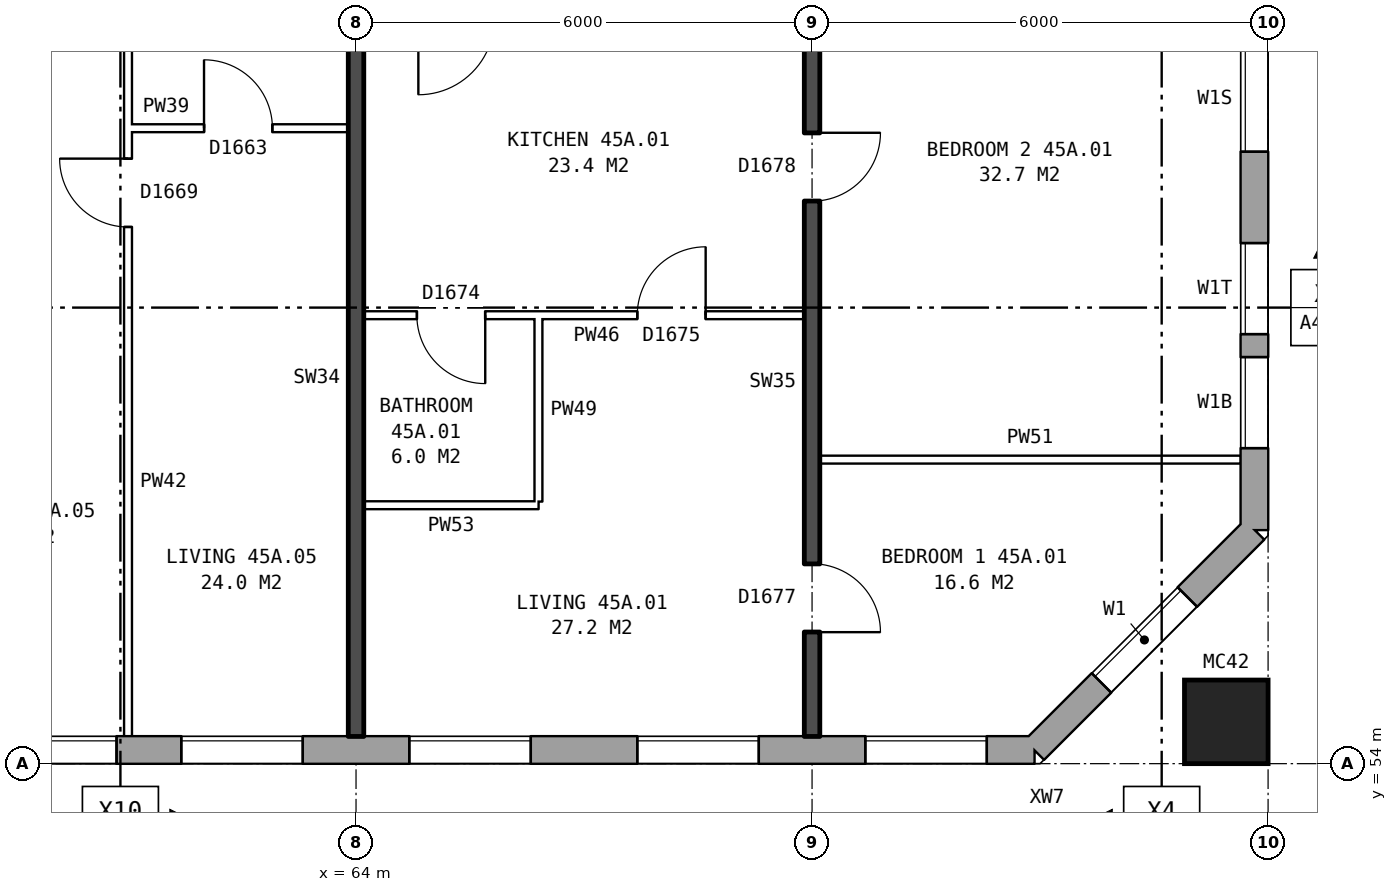
"""IFC4 building model, lengths in metres.
Left out: names, types, materials, properties, quantities, classifications, styles, units other than length and angle.
Written with IfcOpenShell. Run it as: python <this file> out.ifc"""

import sys

from ifc_helpers import new_model, si_unit, direction, frame, frame_2d, origin, origin_2d, place, context, subcontext, project, spatial, rectangle, hollow_rectangle, extrude, element, fill, save


model = new_model("IFC4")
c1 = context("Model", 3, precision=1e-05, world=origin(), true_north=direction((0.0, 1.0)))
c2 = subcontext(c1, "Body", "Model", "MODEL_VIEW")
j1 = project(units=[si_unit("LENGTHUNIT", "METRE"), si_unit("PLANEANGLEUNIT", "RADIAN")], contexts=[c1])
p1 = place(None, origin())
s1 = spatial("IfcSite", under=j1, at=p1, CompositionType="ELEMENT")
p2 = place(p1, origin())
s2 = spatial("IfcBuilding", under=s1, at=p2, CompositionType="ELEMENT")
p3 = place(p2, frame((0.0, 0.0, 160.9)))
s3 = spatial("IfcBuildingStorey", under=s2, at=p3, CompositionType="ELEMENT", Elevation=160.9)
p4 = place(p3, frame((75.45, 54.55, 0.0), z_axis=(0.0, 0.0, 1.0), x_axis=(1.0, 0.0, 0.0)))
e1 = element("IfcColumn", 1, at=p4, inside=s3, PredefinedType="COLUMN", context=c2, shape_type="SweptSolid", body=[
    extrude(hollow_rectangle(XDim=1.1, YDim=1.1, WallThickness=0.06, at=origin_2d()), origin(), (0.0, 0.0, 1.0), 3.1),
])
p5 = place(p3, frame((31.575, 54.18, 0.0), z_axis=(0.0, 0.0, 1.0), x_axis=(1.0, 0.0, 0.0)))
e2 = element("IfcWall", 2, at=p5, inside=s3, PredefinedType="STANDARD", context=c2, shape_type="SweptSolid", body=[
    extrude(rectangle(XDim=41.351, YDim=0.36, at=frame_2d((20.675, 0.0))), origin(), (0.0, 0.0, 1.0), 2.85),
])
p6 = place(p5, frame((3.125, 0.0, 0.8)))
e3 = element("IfcOpeningElement", 3, at=p6, cuts=e2, PredefinedType="OPENING", context=c2, shape_type="SweptSolid", body=[
    extrude(rectangle(XDim=1.6, YDim=1.8, at=frame_2d((0.8, 0.9))), frame((0.0, 0.19, 0.0), z_axis=(0.0, -1.0, 0.0), x_axis=(1.0, 0.0, 0.0)), (0.0, 0.0, 1.0), 0.38),
])
p7 = place(p5, frame((6.125, 0.0, 0.8)))
e4 = element("IfcOpeningElement", 4, at=p7, cuts=e2, PredefinedType="OPENING", context=c2, shape_type="SweptSolid", body=[
    extrude(rectangle(XDim=1.6, YDim=1.8, at=frame_2d((0.8, 0.9))), frame((0.0, 0.19, 0.0), z_axis=(0.0, -1.0, 0.0), x_axis=(1.0, 0.0, 0.0)), (0.0, 0.0, 1.0), 0.38),
])
p8 = place(p5, frame((9.125, 0.0, 0.8)))
e5 = element("IfcOpeningElement", 5, at=p8, cuts=e2, PredefinedType="OPENING", context=c2, shape_type="SweptSolid", body=[
    extrude(rectangle(XDim=1.6, YDim=1.8, at=frame_2d((0.8, 0.9))), frame((0.0, 0.19, 0.0), z_axis=(0.0, -1.0, 0.0), x_axis=(1.0, 0.0, 0.0)), (0.0, 0.0, 1.0), 0.38),
])
p9 = place(p5, frame((12.125, 0.0, 0.8)))
e6 = element("IfcOpeningElement", 6, at=p9, cuts=e2, PredefinedType="OPENING", context=c2, shape_type="SweptSolid", body=[
    extrude(rectangle(XDim=1.6, YDim=1.8, at=frame_2d((0.8, 0.9))), frame((0.0, 0.19, 0.0), z_axis=(0.0, -1.0, 0.0), x_axis=(1.0, 0.0, 0.0)), (0.0, 0.0, 1.0), 0.38),
])
p10 = place(p5, frame((15.375, 0.0, 0.25)))
e7 = element("IfcOpeningElement", 7, at=p10, cuts=e2, PredefinedType="OPENING", context=c2, shape_type="SweptSolid", body=[
    extrude(rectangle(XDim=0.6, YDim=0.9, at=frame_2d((0.3, 0.45))), frame((0.0, 0.19, 0.0), z_axis=(0.0, -1.0, 0.0), x_axis=(1.0, 0.0, 0.0)), (0.0, 0.0, 1.0), 0.38),
])
p11 = place(p5, frame((18.125, 0.0, 0.8)))
e8 = element("IfcOpeningElement", 8, at=p11, cuts=e2, PredefinedType="OPENING", context=c2, shape_type="SweptSolid", body=[
    extrude(rectangle(XDim=1.6, YDim=1.8, at=frame_2d((0.8, 0.9))), frame((0.0, 0.19, 0.0), z_axis=(0.0, -1.0, 0.0), x_axis=(1.0, 0.0, 0.0)), (0.0, 0.0, 1.0), 0.38),
])
p12 = place(p5, frame((21.125, 0.0, 0.8)))
e9 = element("IfcOpeningElement", 9, at=p12, cuts=e2, PredefinedType="OPENING", context=c2, shape_type="SweptSolid", body=[
    extrude(rectangle(XDim=1.6, YDim=1.8, at=frame_2d((0.8, 0.9))), frame((0.0, 0.19, 0.0), z_axis=(0.0, -1.0, 0.0), x_axis=(1.0, 0.0, 0.0)), (0.0, 0.0, 1.0), 0.38),
])
p13 = place(p5, frame((23.575, 0.0, 0.25)))
e10 = element("IfcOpeningElement", 10, at=p13, cuts=e2, PredefinedType="OPENING", context=c2, shape_type="SweptSolid", body=[
    extrude(rectangle(XDim=1.2, YDim=1.8, at=frame_2d((0.6, 0.9))), frame((0.0, 0.19, 0.0), z_axis=(0.0, -1.0, 0.0), x_axis=(1.0, 0.0, 0.0)), (0.0, 0.0, 1.0), 0.38),
])
p14 = place(p5, frame((26.625, 0.0, 1.7)))
e11 = element("IfcOpeningElement", 11, at=p14, cuts=e2, PredefinedType="OPENING", context=c2, shape_type="SweptSolid", body=[
    extrude(rectangle(XDim=0.6, YDim=0.9, at=frame_2d((0.3, 0.45))), frame((0.0, 0.19, 0.0), z_axis=(0.0, -1.0, 0.0), x_axis=(1.0, 0.0, 0.0)), (0.0, 0.0, 1.0), 0.38),
])
p15 = place(p5, frame((30.125, 0.0, 0.8)))
e12 = element("IfcOpeningElement", 12, at=p15, cuts=e2, PredefinedType="OPENING", context=c2, shape_type="SweptSolid", body=[
    extrude(rectangle(XDim=1.6, YDim=1.8, at=frame_2d((0.8, 0.9))), frame((0.0, 0.19, 0.0), z_axis=(0.0, -1.0, 0.0), x_axis=(1.0, 0.0, 0.0)), (0.0, 0.0, 1.0), 0.38),
])
p16 = place(p5, frame((33.125, 0.0, 0.8)))
e13 = element("IfcOpeningElement", 13, at=p16, cuts=e2, PredefinedType="OPENING", context=c2, shape_type="SweptSolid", body=[
    extrude(rectangle(XDim=1.6, YDim=1.8, at=frame_2d((0.8, 0.9))), frame((0.0, 0.19, 0.0), z_axis=(0.0, -1.0, 0.0), x_axis=(1.0, 0.0, 0.0)), (0.0, 0.0, 1.0), 0.38),
])
p17 = place(p5, frame((36.125, 0.0, 0.8)))
e14 = element("IfcOpeningElement", 14, at=p17, cuts=e2, PredefinedType="OPENING", context=c2, shape_type="SweptSolid", body=[
    extrude(rectangle(XDim=1.6, YDim=1.8, at=frame_2d((0.8, 0.9))), frame((0.0, 0.19, 0.0), z_axis=(0.0, -1.0, 0.0), x_axis=(1.0, 0.0, 0.0)), (0.0, 0.0, 1.0), 0.38),
])
p18 = place(p5, frame((39.125, 0.0, 0.8)))
e15 = element("IfcOpeningElement", 15, at=p18, cuts=e2, PredefinedType="OPENING", context=c2, shape_type="SweptSolid", body=[
    extrude(rectangle(XDim=1.6, YDim=1.8, at=frame_2d((0.8, 0.9))), frame((0.0, 0.19, 0.0), z_axis=(0.0, -1.0, 0.0), x_axis=(1.0, 0.0, 0.0)), (0.0, 0.0, 1.0), 0.38),
])
p19 = place(p5, frame((16.275, 0.0, 0.35)))
e16 = element("IfcOpeningElement", 16, at=p19, cuts=e2, PredefinedType="OPENING", context=c2, shape_type="SweptSolid", body=[
    extrude(rectangle(XDim=1.0, YDim=1.5, at=frame_2d((0.5, 0.75))), frame((0.0, 0.19, 0.0), z_axis=(0.0, -1.0, 0.0), x_axis=(1.0, 0.0, 0.0)), (0.0, 0.0, 1.0), 0.38),
])
p20 = place(p5, frame((25.075, 0.0, 0.25)))
e17 = element("IfcOpeningElement", 17, at=p20, cuts=e2, PredefinedType="OPENING", context=c2, shape_type="SweptSolid", body=[
    extrude(rectangle(XDim=0.8, YDim=0.9, at=frame_2d((0.4, 0.45))), frame((0.0, 0.19, 0.0), z_axis=(0.0, -1.0, 0.0), x_axis=(1.0, 0.0, 0.0)), (0.0, 0.0, 1.0), 0.38),
])
p21 = place(p5, frame((27.675, 0.0, 0.8)))
e18 = element("IfcOpeningElement", 18, at=p21, cuts=e2, PredefinedType="OPENING", context=c2, shape_type="SweptSolid", body=[
    extrude(rectangle(XDim=1.6, YDim=1.8, at=frame_2d((0.8, 0.9))), frame((0.0, 0.19, 0.0), z_axis=(0.0, -1.0, 0.0), x_axis=(1.0, 0.0, 0.0)), (0.0, 0.0, 1.0), 0.38),
])
p22 = place(p3, frame((72.925, 54.18, 0.0), z_axis=(0.0, 0.0, 1.0), x_axis=(0.707106781187, 0.707106781187, 0.0)))
e19 = element("IfcWall", 19, at=p22, inside=s3, PredefinedType="STANDARD", context=c2, shape_type="SweptSolid", body=[
    extrude(rectangle(XDim=4.094, YDim=0.36, at=frame_2d((2.047, 0.0))), origin(), (0.0, 0.0, 1.0), 2.85),
])
p23 = place(p22, frame((1.247, 0.0, 0.8)))
e20 = element("IfcOpeningElement", 20, at=p23, cuts=e19, PredefinedType="OPENING", context=c2, shape_type="SweptSolid", body=[
    extrude(rectangle(XDim=1.6, YDim=1.8, at=frame_2d((0.8, 0.9))), frame((0.0, 0.19, 0.0), z_axis=(0.0, -1.0, 0.0), x_axis=(1.0, 0.0, 0.0)), (0.0, 0.0, 1.0), 0.38),
])
p24 = place(p3, frame((75.82, 57.075, 0.0), z_axis=(0.0, 0.0, 1.0), x_axis=(0.0, 1.0, 0.0)))
e21 = element("IfcWall", 21, at=p24, inside=s3, PredefinedType="STANDARD", context=c2, shape_type="SweptSolid", body=[
    extrude(rectangle(XDim=25.851, YDim=0.36, at=frame_2d((12.925, 0.0))), origin(), (0.0, 0.0, 1.0), 2.85),
])
p25 = place(p24, frame((1.075, 0.0, 0.8)))
e22 = element("IfcOpeningElement", 22, at=p25, cuts=e21, PredefinedType="OPENING", context=c2, shape_type="SweptSolid", body=[
    extrude(rectangle(XDim=1.2, YDim=1.8, at=frame_2d((0.6, 0.9))), frame((0.0, 0.19, 0.0), z_axis=(0.0, -1.0, 0.0), x_axis=(1.0, 0.0, 0.0)), (0.0, 0.0, 1.0), 0.38),
])
p26 = place(p24, frame((2.575, 0.0, 0.8)))
e23 = element("IfcOpeningElement", 23, at=p26, cuts=e21, PredefinedType="OPENING", context=c2, shape_type="SweptSolid", body=[
    extrude(rectangle(XDim=1.2, YDim=0.9, at=frame_2d((0.6, 0.45))), frame((0.0, 0.19, 0.0), z_axis=(0.0, -1.0, 0.0), x_axis=(1.0, 0.0, 0.0)), (0.0, 0.0, 1.0), 0.38),
])
p27 = place(p24, frame((19.475, 0.0, 1.7)))
e24 = element("IfcOpeningElement", 24, at=p27, cuts=e21, PredefinedType="OPENING", context=c2, shape_type="SweptSolid", body=[
    extrude(rectangle(XDim=1.4, YDim=0.9, at=frame_2d((0.7, 0.45))), frame((0.0, 0.19, 0.0), z_axis=(0.0, -1.0, 0.0), x_axis=(1.0, 0.0, 0.0)), (0.0, 0.0, 1.0), 0.38),
])
p28 = place(p24, frame((21.925, 0.0, 0.8)))
e25 = element("IfcOpeningElement", 25, at=p28, cuts=e21, PredefinedType="OPENING", context=c2, shape_type="SweptSolid", body=[
    extrude(rectangle(XDim=1.2, YDim=0.9, at=frame_2d((0.6, 0.45))), frame((0.0, 0.19, 0.0), z_axis=(0.0, -1.0, 0.0), x_axis=(1.0, 0.0, 0.0)), (0.0, 0.0, 1.0), 0.38),
])
p29 = place(p24, frame((4.975, 0.0, 1.7)))
e26 = element("IfcOpeningElement", 26, at=p29, cuts=e21, PredefinedType="OPENING", context=c2, shape_type="SweptSolid", body=[
    extrude(rectangle(XDim=1.4, YDim=0.9, at=frame_2d((0.7, 0.45))), frame((0.0, 0.19, 0.0), z_axis=(0.0, -1.0, 0.0), x_axis=(1.0, 0.0, 0.0)), (0.0, 0.0, 1.0), 0.38),
])
p30 = place(p24, frame((23.475, 0.0, 0.8)))
e27 = element("IfcOpeningElement", 27, at=p30, cuts=e21, PredefinedType="OPENING", context=c2, shape_type="SweptSolid", body=[
    extrude(rectangle(XDim=1.2, YDim=1.8, at=frame_2d((0.6, 0.9))), frame((0.0, 0.19, 0.0), z_axis=(0.0, -1.0, 0.0), x_axis=(1.0, 0.0, 0.0)), (0.0, 0.0, 1.0), 0.38),
])
p31 = place(p3, frame((64.1, 57.4, 0.0), z_axis=(0.0, 0.0, 1.0), x_axis=(1.0, 0.0, 0.0)))
e28 = element("IfcWall", 28, at=p31, inside=s3, PredefinedType="PARTITIONING", context=c2, shape_type="SweptSolid", body=[
    extrude(rectangle(XDim=2.3, YDim=0.1, at=frame_2d((1.15, 0.0))), origin(), (0.0, 0.0, 1.0), 2.85),
])
p32 = place(p3, frame((70.1, 58.0, 0.0), z_axis=(0.0, 0.0, 1.0), x_axis=(1.0, 0.0, 0.0)))
e29 = element("IfcWall", 29, at=p32, inside=s3, PredefinedType="PARTITIONING", context=c2, shape_type="SweptSolid", body=[
    extrude(rectangle(XDim=5.54, YDim=0.1, at=frame_2d((2.77, 0.0))), origin(), (0.0, 0.0, 1.0), 2.85),
])
p33 = place(p3, frame((64.1, 59.9, 0.0), z_axis=(0.0, 0.0, 1.0), x_axis=(1.0, 0.0, 0.0)))
e30 = element("IfcWall", 30, at=p33, inside=s3, PredefinedType="PARTITIONING", context=c2, shape_type="SweptSolid", body=[
    extrude(rectangle(XDim=5.8, YDim=0.1, at=frame_2d((2.9, 0.0))), origin(), (0.0, 0.0, 1.0), 2.85),
])
p34 = place(p33, frame((3.6, 0.0, 0.0)))
e31 = element("IfcOpeningElement", 31, at=p34, cuts=e30, PredefinedType="OPENING", context=c2, shape_type="SweptSolid", body=[
    extrude(rectangle(XDim=0.9, YDim=2.1, at=frame_2d((0.45, 1.05))), frame((0.0, 0.06, 0.0), z_axis=(0.0, -1.0, 0.0), x_axis=(1.0, 0.0, 0.0)), (0.0, 0.0, 1.0), 0.12),
])
p35 = place(p33, frame((0.7, 0.0, 0.0)))
e32 = element("IfcOpeningElement", 32, at=p35, cuts=e30, PredefinedType="OPENING", context=c2, shape_type="SweptSolid", body=[
    extrude(rectangle(XDim=0.9, YDim=2.1, at=frame_2d((0.45, 1.05))), frame((0.0, 0.06, 0.0), z_axis=(0.0, -1.0, 0.0), x_axis=(1.0, 0.0, 0.0)), (0.0, 0.0, 1.0), 0.12),
])
p36 = place(p3, frame((61.0, 62.36, 0.0), z_axis=(0.0, 0.0, 1.0), x_axis=(1.0, 0.0, 0.0)))
e33 = element("IfcWall", 33, at=p36, inside=s3, PredefinedType="PARTITIONING", context=c2, shape_type="SweptSolid", body=[
    extrude(rectangle(XDim=2.9, YDim=0.1, at=frame_2d((1.45, 0.0))), origin(), (0.0, 0.0, 1.0), 2.85),
])
p37 = place(p36, frame((1.0, 0.0, 0.0)))
e34 = element("IfcOpeningElement", 34, at=p37, cuts=e33, PredefinedType="OPENING", context=c2, shape_type="SweptSolid", body=[
    extrude(rectangle(XDim=0.9, YDim=2.1, at=frame_2d((0.45, 1.05))), frame((0.0, 0.06, 0.0), z_axis=(0.0, -1.0, 0.0), x_axis=(1.0, 0.0, 0.0)), (0.0, 0.0, 1.0), 0.12),
])
p38 = place(p3, frame((61.0, 54.36, 0.0), z_axis=(0.0, 0.0, 1.0), x_axis=(0.0, 1.0, 0.0)))
e35 = element("IfcWall", 35, at=p38, inside=s3, PredefinedType="PARTITIONING", context=c2, shape_type="SweptSolid", body=[
    extrude(rectangle(XDim=14.34, YDim=0.1, at=frame_2d((7.17, 0.0))), origin(), (0.0, 0.0, 1.0), 2.85),
])
p39 = place(p38, frame((6.7, 0.0, 0.0)))
e36 = element("IfcOpeningElement", 36, at=p39, cuts=e35, PredefinedType="OPENING", context=c2, shape_type="SweptSolid", body=[
    extrude(rectangle(XDim=0.9, YDim=2.1, at=frame_2d((0.45, 1.05))), frame((0.0, 0.06, 0.0), z_axis=(0.0, -1.0, 0.0), x_axis=(1.0, 0.0, 0.0)), (0.0, 0.0, 1.0), 0.12),
])
p40 = place(p38, frame((12.54, 0.0, 0.0)))
e37 = element("IfcOpeningElement", 37, at=p40, cuts=e35, PredefinedType="OPENING", context=c2, shape_type="SweptSolid", body=[
    extrude(rectangle(XDim=0.9, YDim=2.1, at=frame_2d((0.45, 1.05))), frame((0.0, 0.06, 0.0), z_axis=(0.0, -1.0, 0.0), x_axis=(1.0, 0.0, 0.0)), (0.0, 0.0, 1.0), 0.12),
])
p41 = place(p3, frame((64.0, 54.36, 0.0), z_axis=(0.0, 0.0, 1.0), x_axis=(0.0, 1.0, 0.0)))
e38 = element("IfcWall", 38, at=p41, inside=s3, PredefinedType="SOLIDWALL", context=c2, shape_type="SweptSolid", body=[
    extrude(rectangle(XDim=9.44, YDim=0.2, at=frame_2d((4.72, 0.0))), origin(), (0.0, 0.0, 1.0), 2.85),
])
p42 = place(p3, frame((66.4, 57.45, 0.0), z_axis=(0.0, 0.0, 1.0), x_axis=(0.0, 1.0, 0.0)))
e39 = element("IfcWall", 39, at=p42, inside=s3, PredefinedType="PARTITIONING", context=c2, shape_type="SweptSolid", body=[
    extrude(rectangle(XDim=2.4, YDim=0.1, at=frame_2d((1.2, 0.0))), origin(), (0.0, 0.0, 1.0), 2.85),
])
p43 = place(p3, frame((70.0, 54.36, 0.0), z_axis=(0.0, 0.0, 1.0), x_axis=(0.0, 1.0, 0.0)))
e40 = element("IfcWall", 40, at=p43, inside=s3, PredefinedType="SOLIDWALL", context=c2, shape_type="SweptSolid", body=[
    extrude(rectangle(XDim=9.44, YDim=0.2, at=frame_2d((4.72, 0.0))), origin(), (0.0, 0.0, 1.0), 2.85),
])
p44 = place(p43, frame((1.37, 0.0, 0.0)))
e41 = element("IfcOpeningElement", 41, at=p44, cuts=e40, PredefinedType="OPENING", context=c2, shape_type="SweptSolid", body=[
    extrude(rectangle(XDim=0.9, YDim=2.1, at=frame_2d((0.45, 1.05))), frame((0.0, 0.11, 0.0), z_axis=(0.0, -1.0, 0.0), x_axis=(1.0, 0.0, 0.0)), (0.0, 0.0, 1.0), 0.22),
])
p45 = place(p43, frame((7.04, 0.0, 0.0)))
e42 = element("IfcOpeningElement", 42, at=p45, cuts=e40, PredefinedType="OPENING", context=c2, shape_type="SweptSolid", body=[
    extrude(rectangle(XDim=0.9, YDim=2.1, at=frame_2d((0.45, 1.05))), frame((0.0, 0.11, 0.0), z_axis=(0.0, -1.0, 0.0), x_axis=(1.0, 0.0, 0.0)), (0.0, 0.0, 1.0), 0.22),
])
p46 = place(p15, origin())
e43 = element("IfcWindow", 43, at=p46, inside=s3, PartitioningType="SINGLE_PANEL", PredefinedType="WINDOW", context=c2, shape_type="SweptSolid", body=[
    extrude(rectangle(XDim=1.6, YDim=1.8, at=frame_2d((0.8, 0.9))), frame((0.0, 0.15, 0.0), z_axis=(0.0, -1.0, 0.0), x_axis=(1.0, 0.0, 0.0)), (0.0, 0.0, 1.0), 0.06),
])
fill(e12, e43)
p47 = place(p16, origin())
e44 = element("IfcWindow", 44, at=p47, inside=s3, PartitioningType="SINGLE_PANEL", PredefinedType="WINDOW", context=c2, shape_type="SweptSolid", body=[
    extrude(rectangle(XDim=1.6, YDim=1.8, at=frame_2d((0.8, 0.9))), frame((0.0, 0.15, 0.0), z_axis=(0.0, -1.0, 0.0), x_axis=(1.0, 0.0, 0.0)), (0.0, 0.0, 1.0), 0.06),
])
fill(e13, e44)
p48 = place(p17, origin())
e45 = element("IfcWindow", 45, at=p48, inside=s3, PartitioningType="SINGLE_PANEL", PredefinedType="WINDOW", context=c2, shape_type="SweptSolid", body=[
    extrude(rectangle(XDim=1.6, YDim=1.8, at=frame_2d((0.8, 0.9))), frame((0.0, 0.15, 0.0), z_axis=(0.0, -1.0, 0.0), x_axis=(1.0, 0.0, 0.0)), (0.0, 0.0, 1.0), 0.06),
])
fill(e14, e45)
p49 = place(p18, origin())
e46 = element("IfcWindow", 46, at=p49, inside=s3, PartitioningType="SINGLE_PANEL", PredefinedType="WINDOW", context=c2, shape_type="SweptSolid", body=[
    extrude(rectangle(XDim=1.6, YDim=1.8, at=frame_2d((0.8, 0.9))), frame((0.0, 0.15, 0.0), z_axis=(0.0, -1.0, 0.0), x_axis=(1.0, 0.0, 0.0)), (0.0, 0.0, 1.0), 0.06),
])
fill(e15, e46)
p50 = place(p23, origin())
e47 = element("IfcWindow", 47, at=p50, inside=s3, PartitioningType="SINGLE_PANEL", PredefinedType="WINDOW", context=c2, shape_type="SweptSolid", body=[
    extrude(rectangle(XDim=1.6, YDim=1.8, at=frame_2d((0.8, 0.9))), frame((0.0, 0.15, 0.0), z_axis=(0.0, -1.0, 0.0), x_axis=(1.0, 0.0, 0.0)), (0.0, 0.0, 1.0), 0.06),
])
fill(e20, e47)
p51 = place(p25, origin())
e48 = element("IfcWindow", 48, at=p51, inside=s3, PartitioningType="SINGLE_PANEL", PredefinedType="WINDOW", context=c2, shape_type="SweptSolid", body=[
    extrude(rectangle(XDim=1.2, YDim=1.8, at=frame_2d((0.6, 0.9))), frame((0.0, 0.15, 0.0), z_axis=(0.0, -1.0, 0.0), x_axis=(1.0, 0.0, 0.0)), (0.0, 0.0, 1.0), 0.06),
])
fill(e22, e48)
p52 = place(p26, origin())
e49 = element("IfcWindow", 49, at=p52, inside=s3, PartitioningType="SINGLE_PANEL", PredefinedType="WINDOW", context=c2, shape_type="SweptSolid", body=[
    extrude(rectangle(XDim=1.2, YDim=0.9, at=frame_2d((0.6, 0.45))), frame((0.0, 0.15, 0.0), z_axis=(0.0, -1.0, 0.0), x_axis=(1.0, 0.0, 0.0)), (0.0, 0.0, 1.0), 0.06),
])
fill(e23, e49)
p53 = place(p44, frame((0.9, 0.0, 0.0), z_axis=(0.0, 0.0, 1.0), x_axis=(-1.0, 0.0, 0.0)))
e50 = element("IfcDoor", 50, at=p53, inside=s3, OperationType="SINGLE_SWING_RIGHT", PredefinedType="DOOR", context=c2, shape_type="SweptSolid", body=[
    extrude(rectangle(XDim=0.9, YDim=2.1, at=frame_2d((0.45, 1.05))), frame((0.0, 0.025, 0.0), z_axis=(0.0, -1.0, 0.0), x_axis=(1.0, 0.0, 0.0)), (0.0, 0.0, 1.0), 0.05),
])
fill(e41, e50)
p54 = place(p45, frame((0.9, 0.0, 0.0), z_axis=(0.0, 0.0, 1.0), x_axis=(-1.0, 0.0, 0.0)))
e51 = element("IfcDoor", 51, at=p54, inside=s3, OperationType="SINGLE_SWING_LEFT", PredefinedType="DOOR", context=c2, shape_type="SweptSolid", body=[
    extrude(rectangle(XDim=0.9, YDim=2.1, at=frame_2d((0.45, 1.05))), frame((0.0, 0.025, 0.0), z_axis=(0.0, -1.0, 0.0), x_axis=(1.0, 0.0, 0.0)), (0.0, 0.0, 1.0), 0.05),
])
fill(e42, e51)
p55 = place(p34, origin())
e52 = element("IfcDoor", 52, at=p55, inside=s3, OperationType="SINGLE_SWING_RIGHT", PredefinedType="DOOR", context=c2, shape_type="SweptSolid", body=[
    extrude(rectangle(XDim=0.9, YDim=2.1, at=frame_2d((0.45, 1.05))), frame((0.0, 0.025, 0.0), z_axis=(0.0, -1.0, 0.0), x_axis=(1.0, 0.0, 0.0)), (0.0, 0.0, 1.0), 0.05),
])
fill(e31, e52)
p56 = place(p35, frame((0.9, 0.0, 0.0), z_axis=(0.0, 0.0, 1.0), x_axis=(-1.0, 0.0, 0.0)))
e53 = element("IfcDoor", 53, at=p56, inside=s3, OperationType="SINGLE_SWING_LEFT", PredefinedType="DOOR", context=c2, shape_type="SweptSolid", body=[
    extrude(rectangle(XDim=0.9, YDim=2.1, at=frame_2d((0.45, 1.05))), frame((0.0, 0.025, 0.0), z_axis=(0.0, -1.0, 0.0), x_axis=(1.0, 0.0, 0.0)), (0.0, 0.0, 1.0), 0.05),
])
fill(e32, e53)
p57 = place(p39, origin())
e54 = element("IfcDoor", 54, at=p57, inside=s3, OperationType="SINGLE_SWING_RIGHT", PredefinedType="DOOR", context=c2, shape_type="SweptSolid", body=[
    extrude(rectangle(XDim=0.9, YDim=2.1, at=frame_2d((0.45, 1.05))), frame((0.0, 0.025, 0.0), z_axis=(0.0, -1.0, 0.0), x_axis=(1.0, 0.0, 0.0)), (0.0, 0.0, 1.0), 0.05),
])
fill(e36, e54)
p58 = place(p37, origin())
e55 = element("IfcDoor", 55, at=p58, inside=s3, OperationType="SINGLE_SWING_LEFT", PredefinedType="DOOR", context=c2, shape_type="SweptSolid", body=[
    extrude(rectangle(XDim=0.9, YDim=2.1, at=frame_2d((0.45, 1.05))), frame((0.0, 0.025, 0.0), z_axis=(0.0, -1.0, 0.0), x_axis=(1.0, 0.0, 0.0)), (0.0, 0.0, 1.0), 0.05),
])
fill(e34, e55)
p59 = place(p21, origin())
e56 = element("IfcWindow", 56, at=p59, inside=s3, PartitioningType="SINGLE_PANEL", PredefinedType="WINDOW", context=c2, shape_type="SweptSolid", body=[
    extrude(rectangle(XDim=1.6, YDim=1.8, at=frame_2d((0.8, 0.9))), frame((0.0, 0.15, 0.0), z_axis=(0.0, -1.0, 0.0), x_axis=(1.0, 0.0, 0.0)), (0.0, 0.0, 1.0), 0.06),
])
fill(e18, e56)
p60 = place(p29, origin())
e57 = element("IfcWindow", 57, at=p60, inside=s3, PartitioningType="SINGLE_PANEL", PredefinedType="WINDOW", context=c2, shape_type="SweptSolid", body=[
    extrude(rectangle(XDim=1.4, YDim=0.9, at=frame_2d((0.7, 0.45))), frame((0.0, 0.15, 0.0), z_axis=(0.0, -1.0, 0.0), x_axis=(1.0, 0.0, 0.0)), (0.0, 0.0, 1.0), 0.06),
])
fill(e26, e57)
save(model, sys.argv[1])
